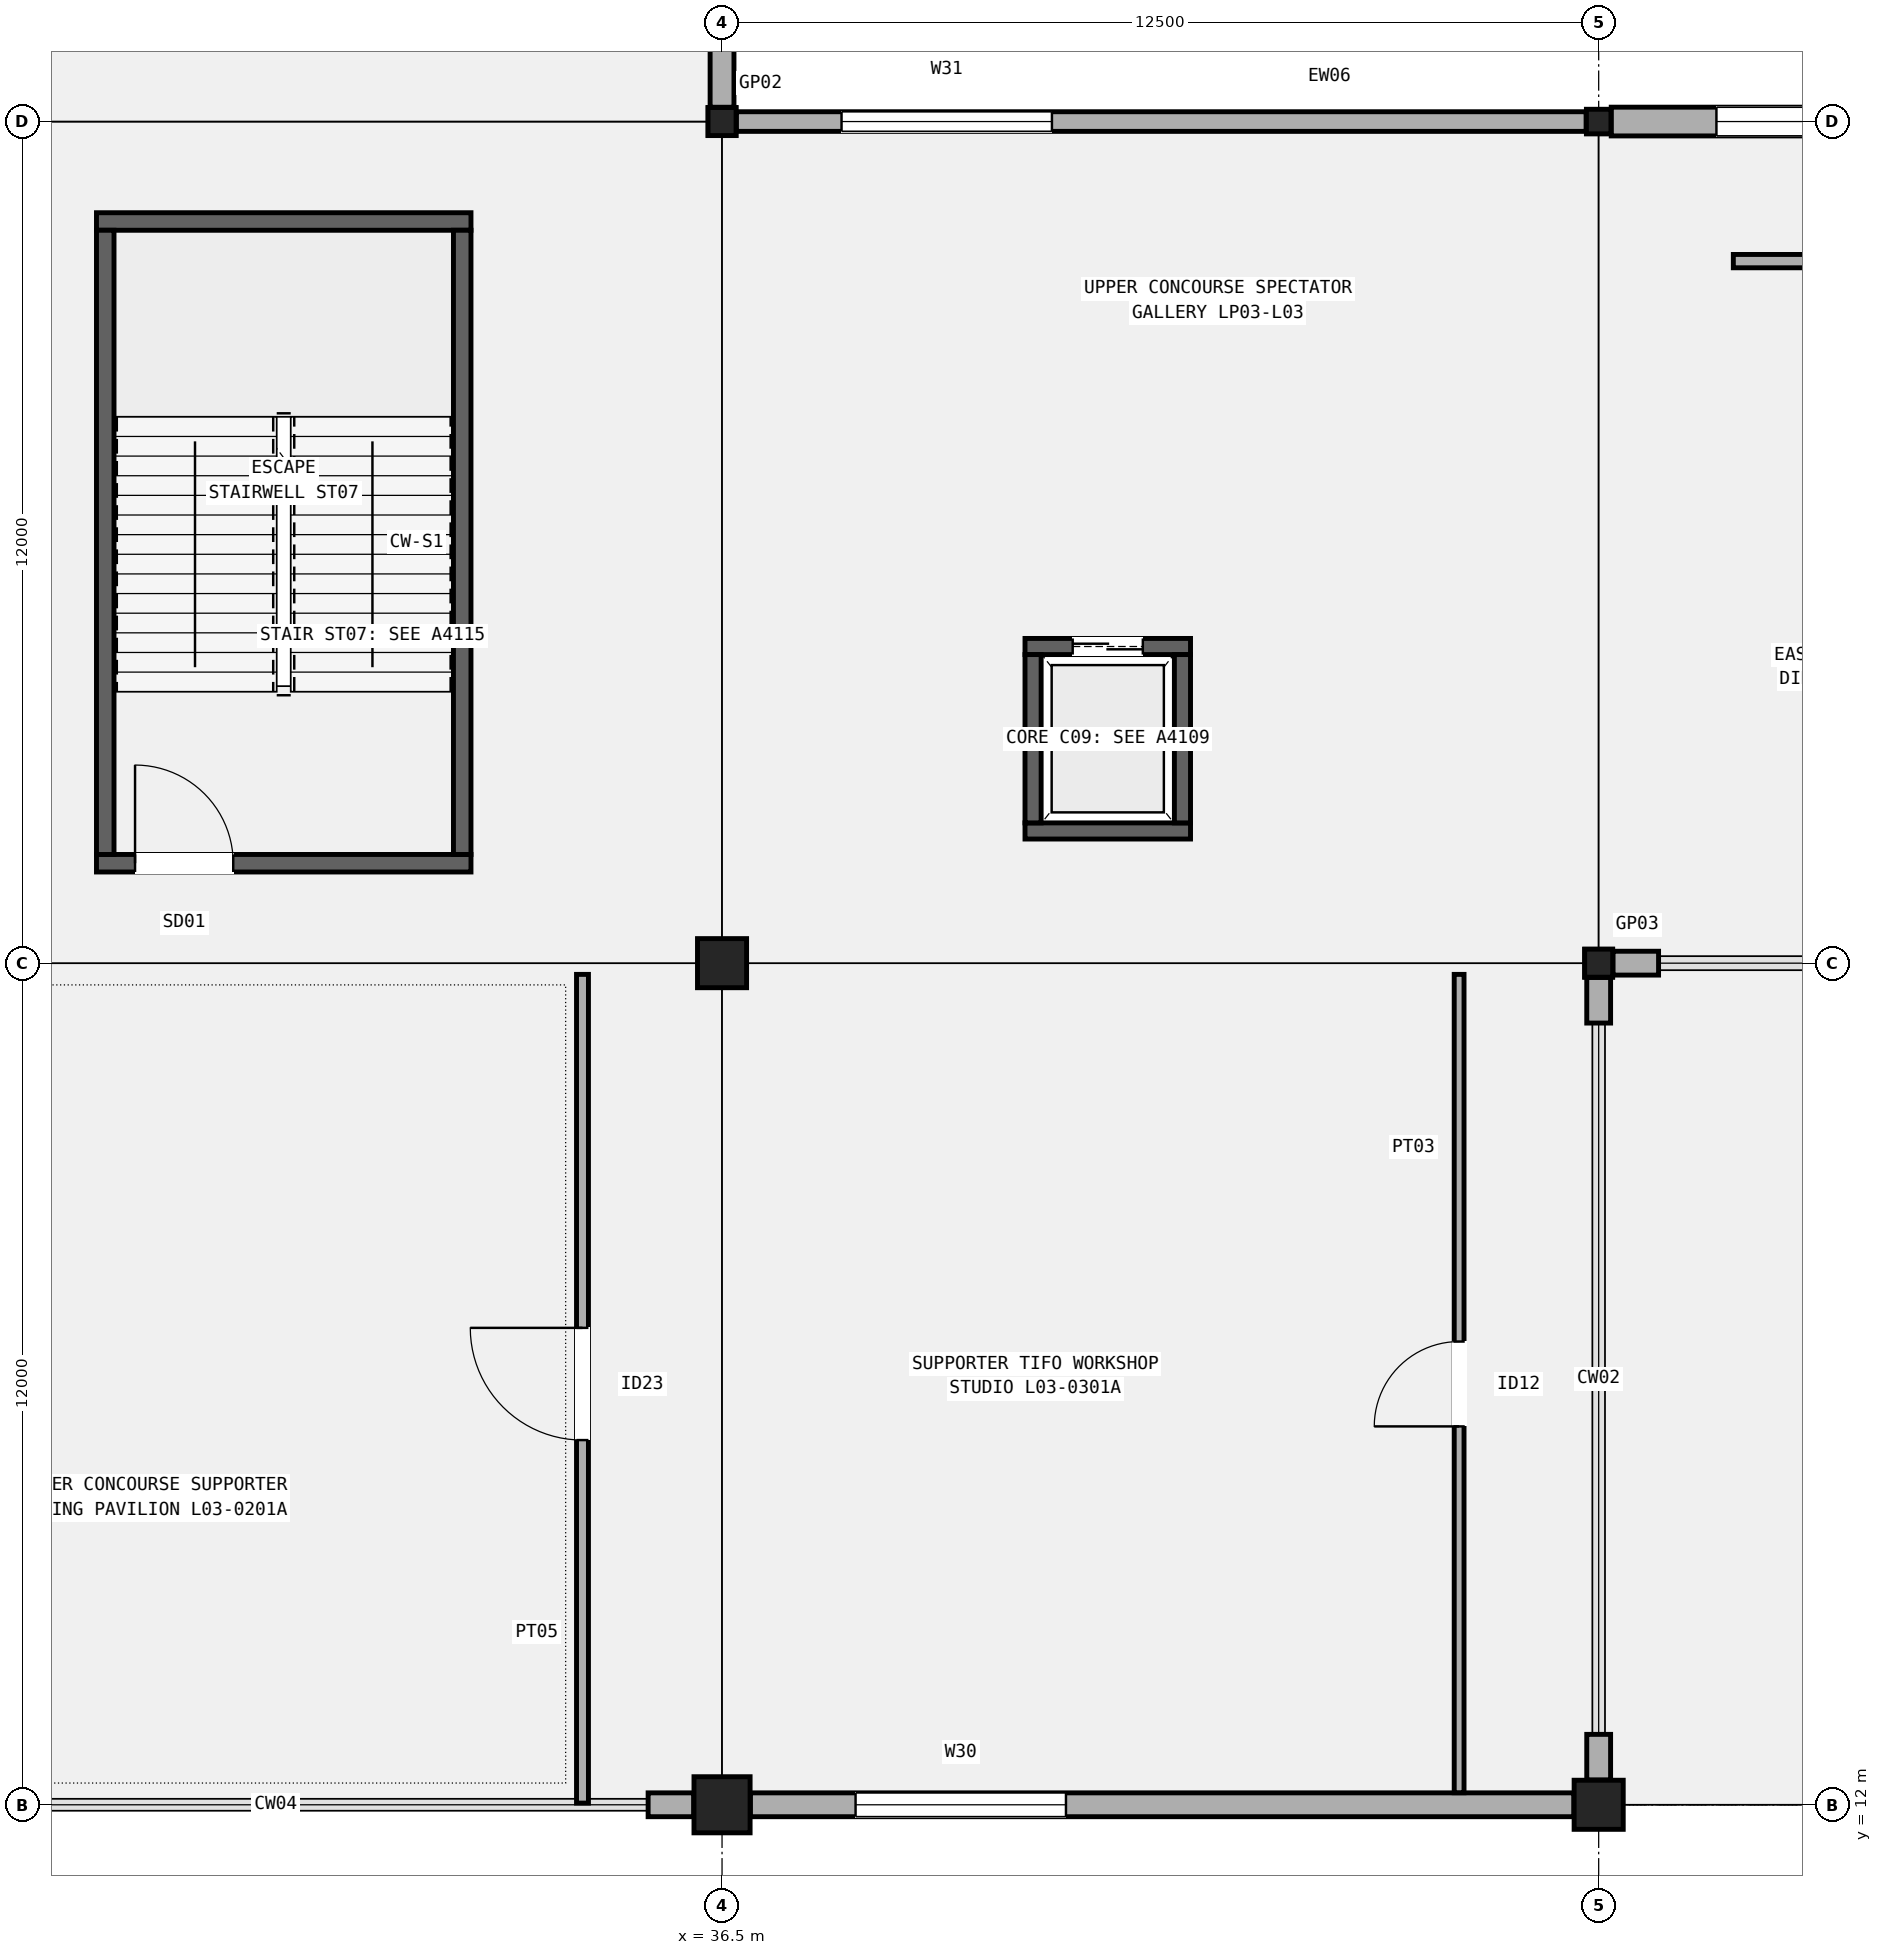
"""IFC4 building model, lengths in metres.
Left out: names, types, materials, properties, quantities, classifications, styles, units other than length and angle.
Written with IfcOpenShell. Run it as: python <this file> out.ifc"""

import sys

from ifc_helpers import new_model, si_unit, direction, frame, frame_2d, origin, origin_2d, place, context, subcontext, project, spatial, rectangle, hollow_rectangle, extrude, element, fill, save


model = new_model("IFC4")
c1 = context("Model", 3, precision=1e-05, world=origin(), true_north=direction((0.0, 1.0)))
c2 = subcontext(c1, "Body", "Model", "MODEL_VIEW")
j1 = project(units=[si_unit("LENGTHUNIT", "METRE"), si_unit("PLANEANGLEUNIT", "RADIAN")], contexts=[c1])
p1 = place(None, origin())
s1 = spatial("IfcSite", under=j1, at=p1, CompositionType="ELEMENT")
p2 = place(p1, origin())
s2 = spatial("IfcBuilding", under=s1, at=p2, CompositionType="ELEMENT")
p3 = place(p2, frame((0.0, 0.0, 15.3)))
s3 = spatial("IfcBuildingStorey", under=s2, at=p3, CompositionType="ELEMENT", Elevation=15.3)
p4 = place(p3, frame((36.5, 12.0, 0.0), z_axis=(0.0, 0.0, 1.0), x_axis=(1.0, 0.0, 0.0)))
e1 = element("IfcColumn", 1, at=p4, inside=s3, PredefinedType="COLUMN", context=c2, shape_type="SweptSolid", body=[
    extrude(rectangle(XDim=0.8, YDim=0.8, at=origin_2d()), origin(), (0.0, 0.0, 1.0), 5.1),
])
p5 = place(p3, frame((36.5, 24.0, 0.0), z_axis=(0.0, 0.0, 1.0), x_axis=(1.0, 0.0, 0.0)))
e2 = element("IfcColumn", 2, at=p5, inside=s3, PredefinedType="COLUMN", context=c2, shape_type="SweptSolid", body=[
    extrude(rectangle(XDim=0.7, YDim=0.7, at=origin_2d()), origin(), (0.0, 0.0, 1.0), 5.1),
])
p6 = place(p3, frame((36.5, 36.0, 0.0), z_axis=(0.0, 0.0, 1.0), x_axis=(1.0, 0.0, 0.0)))
e3 = element("IfcColumn", 3, at=p6, inside=s3, PredefinedType="COLUMN", context=c2, shape_type="SweptSolid", body=[
    extrude(hollow_rectangle(XDim=0.4, YDim=0.4, WallThickness=0.016, InnerFilletRadius=0.016, OuterFilletRadius=0.032, at=origin_2d()), origin(), (0.0, 0.0, 1.0), 5.1),
])
p7 = place(p3, frame((49.0, 12.0, 0.0), z_axis=(0.0, 0.0, 1.0), x_axis=(1.0, 0.0, 0.0)))
e4 = element("IfcColumn", 4, at=p7, inside=s3, PredefinedType="COLUMN", context=c2, shape_type="SweptSolid", body=[
    extrude(rectangle(XDim=0.7, YDim=0.7, at=origin_2d()), origin(), (0.0, 0.0, 1.0), 5.1),
])
p8 = place(p3, frame((49.0, 24.0, 0.0), z_axis=(0.0, 0.0, 1.0), x_axis=(1.0, 0.0, 0.0)))
e5 = element("IfcColumn", 5, at=p8, inside=s3, PredefinedType="COLUMN", context=c2, shape_type="SweptSolid", body=[
    extrude(hollow_rectangle(XDim=0.4, YDim=0.4, WallThickness=0.016, InnerFilletRadius=0.016, OuterFilletRadius=0.032, at=origin_2d()), origin(), (0.0, 0.0, 1.0), 5.1),
])
p9 = place(p3, frame((49.0, 36.0, 0.0), z_axis=(0.0, 0.0, 1.0), x_axis=(1.0, 0.0, 0.0)))
e6 = element("IfcColumn", 6, at=p9, inside=s3, PredefinedType="COLUMN", context=c2, shape_type="SweptSolid", body=[
    extrude(hollow_rectangle(XDim=0.35, YDim=0.35, WallThickness=0.016, InnerFilletRadius=0.016, OuterFilletRadius=0.032, at=origin_2d()), origin(), (0.0, 0.0, 1.0), 5.1),
])
p10 = place(p3, frame((35.446, 12.0, 0.0), z_axis=(0.0, 0.0, 1.0), x_axis=(1.0, 0.0, 0.0)))
e7 = element("IfcWall", 7, at=p10, inside=s3, PredefinedType="SOLIDWALL", context=c2, shape_type="SweptSolid", body=[
    extrude(rectangle(XDim=0.65, YDim=0.34, at=frame_2d((0.325, 0.0))), origin(), (0.0, 0.0, 1.0), 4.06),
])
p11 = place(p3, frame((36.5, 36.204, 0.0), z_axis=(0.0, 0.0, 1.0), x_axis=(0.0, 1.0, 0.0)))
e8 = element("IfcWall", 8, at=p11, inside=s3, PredefinedType="SOLIDWALL", context=c2, shape_type="SweptSolid", body=[
    extrude(rectangle(XDim=11.617, YDim=0.34, at=frame_2d((5.809, 0.0))), origin(), (0.0, 0.0, 1.0), 4.06),
])
p12 = place(p11, frame((1.5, 0.0, 0.95)))
e9 = element("IfcOpeningElement", 9, at=p12, cuts=e8, PredefinedType="OPENING", context=c2, shape_type="SweptSolid", body=[
    extrude(rectangle(XDim=2.4, YDim=2.05, at=frame_2d((1.2, 1.025))), frame((0.0, 0.18, 0.0), z_axis=(0.0, -1.0, 0.0), x_axis=(1.0, 0.0, 0.0)), (0.0, 0.0, 1.0), 0.36),
])
p13 = place(p3, frame((36.904, 12.0, 0.0), z_axis=(0.0, 0.0, 1.0), x_axis=(1.0, 0.0, 0.0)))
e10 = element("IfcWall", 10, at=p13, inside=s3, PredefinedType="SOLIDWALL", context=c2, shape_type="SweptSolid", body=[
    extrude(rectangle(XDim=11.742, YDim=0.34, at=frame_2d((5.871, 0.0))), origin(), (0.0, 0.0, 1.0), 4.16),
])
p14 = place(p13, frame((1.5, 0.0, 0.95)))
e11 = element("IfcOpeningElement", 11, at=p14, cuts=e10, PredefinedType="OPENING", context=c2, shape_type="SweptSolid", body=[
    extrude(rectangle(XDim=3.0, YDim=1.7, at=frame_2d((1.5, 0.85))), frame((0.0, 0.18, 0.0), z_axis=(0.0, -1.0, 0.0), x_axis=(1.0, 0.0, 0.0)), (0.0, 0.0, 1.0), 0.36),
])
for number, where, z_axis, x_axis in (
    (12, (49.0, 12.354, 0.0), (0.0, 0.0, 1.0), (0.0, 1.0, 0.0)),
    (13, (49.0, 23.146, 0.0), (0.0, 0.0, 1.0), (0.0, 1.0, 0.0)),
):
    element("IfcWall", number, at=place(p3, frame(where, z_axis=z_axis, x_axis=x_axis)), inside=s3, PredefinedType="SOLIDWALL", context=c2, shape_type="SweptSolid", body=[
        extrude(rectangle(XDim=0.65, YDim=0.34, at=frame_2d((0.325, 0.0))), origin(), (0.0, 0.0, 1.0), 4.172),
    ])
p15 = place(p3, frame((36.704, 36.0, 0.0), z_axis=(0.0, 0.0, 1.0), x_axis=(1.0, 0.0, 0.0)))
e14 = element("IfcWall", 14, at=p15, inside=s3, PredefinedType="SOLIDWALL", context=c2, shape_type="SweptSolid", body=[
    extrude(rectangle(XDim=12.117, YDim=0.28, at=frame_2d((6.059, 0.0))), origin(), (0.0, 0.0, 1.0), 4.06),
])
p16 = place(p15, frame((1.5, 0.0, 0.95)))
e15 = element("IfcOpeningElement", 15, at=p16, cuts=e14, PredefinedType="OPENING", context=c2, shape_type="SweptSolid", body=[
    extrude(rectangle(XDim=3.0, YDim=2.15, at=frame_2d((1.5, 1.075))), frame((0.0, 0.15, 0.0), z_axis=(0.0, -1.0, 0.0), x_axis=(1.0, 0.0, 0.0)), (0.0, 0.0, 1.0), 0.3),
])
p17 = place(p3, frame((49.204, 24.0, 0.0), z_axis=(0.0, 0.0, 1.0), x_axis=(1.0, 0.0, 0.0)))
e16 = element("IfcWall", 16, at=p17, inside=s3, PredefinedType="SOLIDWALL", context=c2, shape_type="SweptSolid", body=[
    extrude(rectangle(XDim=0.65, YDim=0.34, at=frame_2d((0.325, 0.0))), origin(), (0.0, 0.0, 1.0), 4.06),
])
p18 = place(p3, frame((49.179, 36.0, 0.0), z_axis=(0.0, 0.0, 1.0), x_axis=(1.0, 0.0, 0.0)))
e17 = element("IfcWall", 17, at=p18, inside=s3, PredefinedType="SOLIDWALL", context=c2, shape_type="SweptSolid", body=[
    extrude(rectangle(XDim=11.917, YDim=0.41, at=frame_2d((5.958, 0.0))), origin(), (0.0, 0.0, 1.0), 4.16),
])
p19 = place(p18, frame((1.5, 0.0, 0.95)))
e18 = element("IfcOpeningElement", 18, at=p19, cuts=e17, PredefinedType="OPENING", context=c2, shape_type="SweptSolid", body=[
    extrude(rectangle(XDim=3.15, YDim=1.9, at=frame_2d((1.575, 0.95))), frame((0.0, 0.215, 0.0), z_axis=(0.0, -1.0, 0.0), x_axis=(1.0, 0.0, 0.0)), (0.0, 0.0, 1.0), 0.43),
])
p20 = place(p3, frame((27.58, 25.425, 0.0), z_axis=(0.0, 0.0, 1.0), x_axis=(1.0, 0.0, 0.0)))
e19 = element("IfcWall", 19, at=p20, inside=s3, PredefinedType="SHEAR", context=c2, shape_type="SweptSolid", body=[
    extrude(rectangle(XDim=5.34, YDim=0.25, at=frame_2d((2.67, 0.0))), origin(), (0.0, 0.0, 1.0), 4.86),
])
p21 = place(p20, frame((0.55, 0.0, 0.0)))
e20 = element("IfcOpeningElement", 20, at=p21, cuts=e19, PredefinedType="OPENING", context=c2, shape_type="SweptSolid", body=[
    extrude(rectangle(XDim=1.4, YDim=2.15, at=frame_2d((0.7, 1.075))), frame((0.0, 0.135, 0.0), z_axis=(0.0, -1.0, 0.0), x_axis=(1.0, 0.0, 0.0)), (0.0, 0.0, 1.0), 0.27),
])
p22 = place(p3, frame((27.58, 34.575, 0.0), z_axis=(0.0, 0.0, 1.0), x_axis=(1.0, 0.0, 0.0)))
e21 = element("IfcWall", 21, at=p22, inside=s3, PredefinedType="SHEAR", context=c2, shape_type="SweptSolid", body=[
    extrude(rectangle(XDim=5.34, YDim=0.25, at=frame_2d((2.67, 0.0))), origin(), (0.0, 0.0, 1.0), 4.86),
])
for number, where, z_axis, x_axis in (
    (22, (27.705, 25.55, 0.0), (0.0, 0.0, 1.0), (0.0, 1.0, 0.0)),
    (23, (32.795, 25.55, 0.0), (0.0, 0.0, 1.0), (0.0, 1.0, 0.0)),
):
    element("IfcWall", number, at=place(p3, frame(where, z_axis=z_axis, x_axis=x_axis)), inside=s3, PredefinedType="SHEAR", context=c2, shape_type="SweptSolid", body=[
        extrude(rectangle(XDim=8.9, YDim=0.25, at=frame_2d((4.45, 0.0))), origin(), (0.0, 0.0, 1.0), 4.86),
    ])
p23 = place(p3, frame((40.82, 25.885, 0.0), z_axis=(0.0, 0.0, 1.0), x_axis=(1.0, 0.0, 0.0)))
e24 = element("IfcWall", 24, at=p23, inside=s3, PredefinedType="SHEAR", context=c2, shape_type="SweptSolid", body=[
    extrude(rectangle(XDim=2.36, YDim=0.23, at=frame_2d((1.18, 0.0))), origin(), (0.0, 0.0, 1.0), 4.86),
])
p24 = place(p3, frame((40.82, 28.515, 0.0), z_axis=(0.0, 0.0, 1.0), x_axis=(1.0, 0.0, 0.0)))
e25 = element("IfcWall", 25, at=p24, inside=s3, PredefinedType="SHEAR", context=c2, shape_type="SweptSolid", body=[
    extrude(rectangle(XDim=2.36, YDim=0.23, at=frame_2d((1.18, 0.0))), origin(), (0.0, 0.0, 1.0), 4.86),
])
p25 = place(p24, frame((0.68, 0.0, 0.0)))
e26 = element("IfcOpeningElement", 26, at=p25, cuts=e25, PredefinedType="OPENING", context=c2, shape_type="SweptSolid", body=[
    extrude(rectangle(XDim=1.0, YDim=2.15, at=frame_2d((0.5, 1.075))), frame((0.0, 0.125, 0.0), z_axis=(0.0, -1.0, 0.0), x_axis=(1.0, 0.0, 0.0)), (0.0, 0.0, 1.0), 0.25),
])
for number, where, z_axis, x_axis in (
    (27, (40.935, 26.0, 0.0), (0.0, 0.0, 1.0), (0.0, 1.0, 0.0)),
    (28, (43.065, 26.0, 0.0), (0.0, 0.0, 1.0), (0.0, 1.0, 0.0)),
):
    element("IfcWall", number, at=place(p3, frame(where, z_axis=z_axis, x_axis=x_axis)), inside=s3, PredefinedType="SHEAR", context=c2, shape_type="SweptSolid", body=[
        extrude(rectangle(XDim=2.4, YDim=0.23, at=frame_2d((1.2, 0.0))), origin(), (0.0, 0.0, 1.0), 4.86),
    ])
p26 = place(p3, frame((34.51, 12.024, 0.0), z_axis=(0.0, 0.0, 1.0), x_axis=(0.0, 1.0, 0.0)))
e29 = element("IfcWall", 29, at=p26, inside=s3, PredefinedType="PARTITIONING", context=c2, shape_type="SweptSolid", body=[
    extrude(rectangle(XDim=11.816, YDim=0.17, at=frame_2d((5.908, 0.0))), origin(), (0.0, 0.0, 1.0), 4.22),
])
p27 = place(p26, frame((5.176, 0.0, 0.0)))
e30 = element("IfcOpeningElement", 30, at=p27, cuts=e29, PredefinedType="OPENING", context=c2, shape_type="SweptSolid", body=[
    extrude(rectangle(XDim=1.6, YDim=2.3, at=frame_2d((0.8, 1.15))), frame((0.0, 0.095, 0.0), z_axis=(0.0, -1.0, 0.0), x_axis=(1.0, 0.0, 0.0)), (0.0, 0.0, 1.0), 0.19),
])
p28 = place(p3, frame((47.01, 12.172, 0.0), z_axis=(0.0, 0.0, 1.0), x_axis=(0.0, 1.0, 0.0)))
e31 = element("IfcWall", 31, at=p28, inside=s3, PredefinedType="PARTITIONING", context=c2, shape_type="SweptSolid", body=[
    extrude(rectangle(XDim=11.668, YDim=0.14, at=frame_2d((5.834, 0.0))), origin(), (0.0, 0.0, 1.0), 2.77),
])
p29 = place(p28, frame((5.223, 0.0, 0.0)))
e32 = element("IfcOpeningElement", 32, at=p29, cuts=e31, PredefinedType="OPENING", context=c2, shape_type="SweptSolid", body=[
    extrude(rectangle(XDim=1.21, YDim=2.18, at=frame_2d((0.605, 1.09))), frame((0.0, 0.08, 0.0), z_axis=(0.0, -1.0, 0.0), x_axis=(1.0, 0.0, 0.0)), (0.0, 0.0, 1.0), 0.16),
])
p30 = place(p3, frame((50.92, 34.01, 0.0), z_axis=(0.0, 0.0, 1.0), x_axis=(1.0, 0.0, 0.0)))
e33 = element("IfcWall", 33, at=p30, inside=s3, PredefinedType="PARTITIONING", context=c2, shape_type="SweptSolid", body=[
    extrude(rectangle(XDim=10.42, YDim=0.19, at=frame_2d((5.21, 0.0))), origin(), (0.0, 0.0, 1.0), 2.77),
])
p31 = place(p30, frame((3.159, 0.0, 0.0), z_axis=(0.0, 0.0, 1.0), x_axis=(-1.0, 0.0, 0.0)))
e34 = element("IfcOpeningElement", 34, at=p31, cuts=e33, PredefinedType="OPENING", context=c2, shape_type="SweptSolid", body=[
    extrude(rectangle(XDim=1.24, YDim=2.22, at=frame_2d((0.62, 1.11))), frame((0.0, 0.105, 0.0), z_axis=(0.0, -1.0, 0.0), x_axis=(1.0, 0.0, 0.0)), (0.0, 0.0, 1.0), 0.21),
])
p32 = place(p30, frame((8.464, 0.0, 0.0), z_axis=(0.0, 0.0, 1.0), x_axis=(-1.0, 0.0, 0.0)))
e35 = element("IfcOpeningElement", 35, at=p32, cuts=e33, PredefinedType="OPENING", context=c2, shape_type="SweptSolid", body=[
    extrude(rectangle(XDim=1.27, YDim=2.2, at=frame_2d((0.635, 1.1))), frame((0.0, 0.105, 0.0), z_axis=(0.0, -1.0, 0.0), x_axis=(1.0, 0.0, 0.0)), (0.0, 0.0, 1.0), 0.21),
])
p33 = place(p14, origin())
e36 = element("IfcWindow", 36, at=p33, inside=s3, PartitioningType="SINGLE_PANEL", PredefinedType="WINDOW", context=c2, shape_type="SweptSolid", body=[
    extrude(rectangle(XDim=3.0, YDim=1.7, at=frame_2d((1.5, 0.85))), frame((0.0, 0.03, 0.0), z_axis=(0.0, -1.0, 0.0), x_axis=(1.0, 0.0, 0.0)), (0.0, 0.0, 1.0), 0.06),
])
fill(e11, e36)
p34 = place(p16, origin())
e37 = element("IfcWindow", 37, at=p34, inside=s3, PartitioningType="SINGLE_PANEL", PredefinedType="WINDOW", context=c2, shape_type="SweptSolid", body=[
    extrude(rectangle(XDim=3.0, YDim=2.15, at=frame_2d((1.5, 1.075))), frame((0.0, 0.03, 0.0), z_axis=(0.0, -1.0, 0.0), x_axis=(1.0, 0.0, 0.0)), (0.0, 0.0, 1.0), 0.06),
])
fill(e15, e37)
p35 = place(p19, origin())
e38 = element("IfcWindow", 38, at=p35, inside=s3, PartitioningType="SINGLE_PANEL", PredefinedType="WINDOW", context=c2, shape_type="SweptSolid", body=[
    extrude(rectangle(XDim=3.15, YDim=1.9, at=frame_2d((1.575, 0.95))), frame((0.0, 0.03, 0.0), z_axis=(0.0, -1.0, 0.0), x_axis=(1.0, 0.0, 0.0)), (0.0, 0.0, 1.0), 0.06),
])
fill(e18, e38)
p36 = place(p21, origin())
e39 = element("IfcDoor", 39, at=p36, inside=s3, OperationType="SINGLE_SWING_LEFT", PredefinedType="DOOR", context=c2, shape_type="SweptSolid", body=[
    extrude(rectangle(XDim=1.4, YDim=2.15, at=frame_2d((0.7, 1.075))), frame((0.0, 0.025, 0.0), z_axis=(0.0, -1.0, 0.0), x_axis=(1.0, 0.0, 0.0)), (0.0, 0.0, 1.0), 0.05),
])
fill(e20, e39)
p37 = place(p25, origin())
e40 = element("IfcDoor", 40, at=p37, inside=s3, OperationType="DOUBLE_DOOR_SLIDING", PredefinedType="DOOR", context=c2, shape_type="SweptSolid", body=[
    extrude(rectangle(XDim=1.0, YDim=2.15, at=frame_2d((0.5, 1.075))), frame((0.0, 0.025, 0.0), z_axis=(0.0, -1.0, 0.0), x_axis=(1.0, 0.0, 0.0)), (0.0, 0.0, 1.0), 0.05),
])
fill(e26, e40)
p38 = place(p27, origin())
e41 = element("IfcDoor", 41, at=p38, inside=s3, OperationType="SINGLE_SWING_RIGHT", PredefinedType="DOOR", context=c2, shape_type="SweptSolid", body=[
    extrude(rectangle(XDim=1.6, YDim=2.3, at=frame_2d((0.8, 1.15))), frame((0.0, 0.025, 0.0), z_axis=(0.0, -1.0, 0.0), x_axis=(1.0, 0.0, 0.0)), (0.0, 0.0, 1.0), 0.05),
])
fill(e30, e41)
p39 = place(p29, origin())
e42 = element("IfcDoor", 42, at=p39, inside=s3, OperationType="SINGLE_SWING_LEFT", PredefinedType="DOOR", context=c2, shape_type="SweptSolid", body=[
    extrude(rectangle(XDim=1.21, YDim=2.18, at=frame_2d((0.605, 1.09))), frame((0.0, 0.025, 0.0), z_axis=(0.0, -1.0, 0.0), x_axis=(1.0, 0.0, 0.0)), (0.0, 0.0, 1.0), 0.05),
])
fill(e32, e42)
save(model, sys.argv[1])
